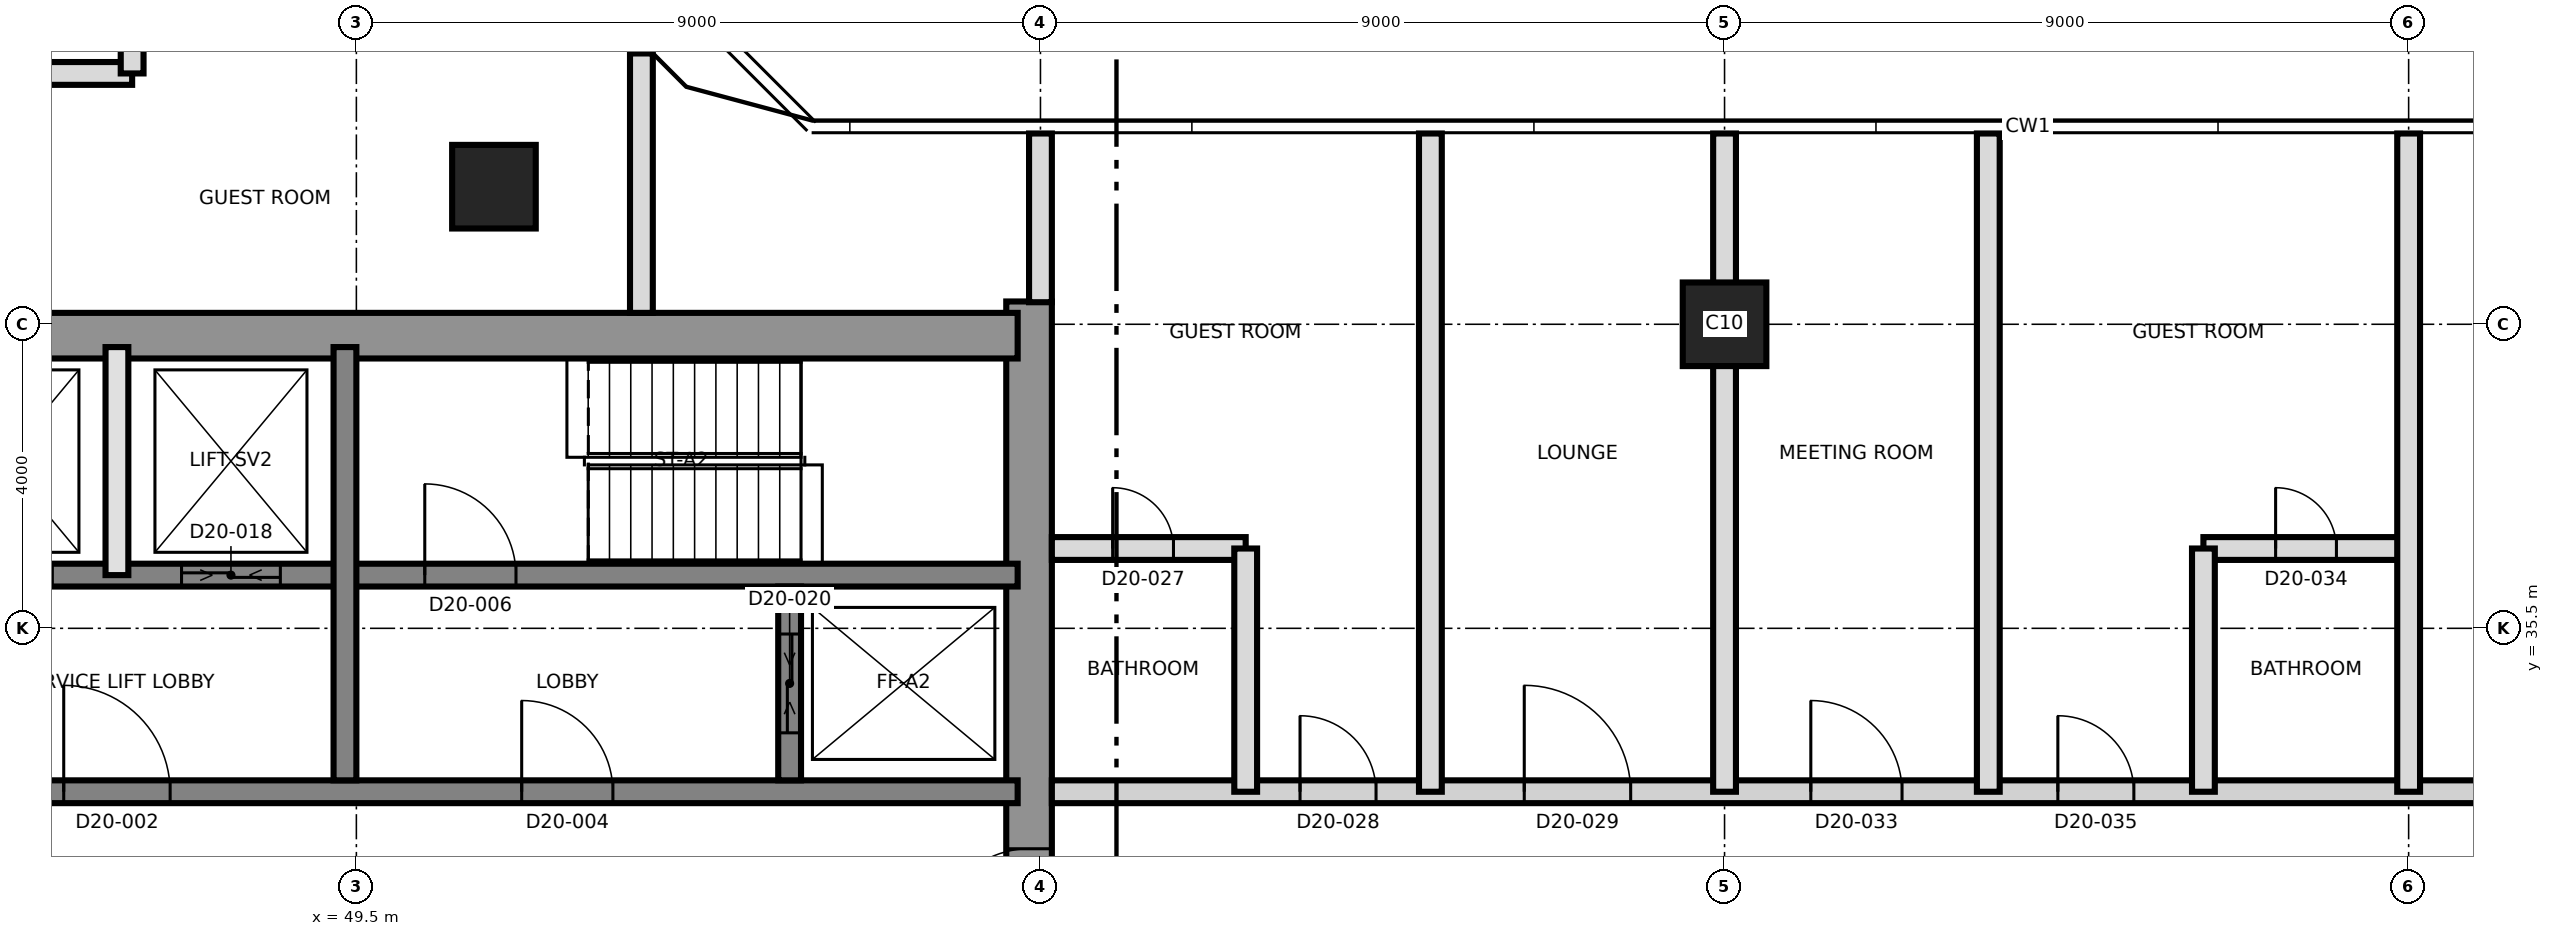
"""IFC4 building model, lengths in metres.
Left out: names, types, materials, properties, quantities, classifications, styles, units other than length and angle.
Written with IfcOpenShell. Run it as: python <this file> out.ifc"""

import sys

from ifc_helpers import new_model, si_unit, direction, frame, frame_2d, origin, origin_2d, place, context, subcontext, project, spatial, rectangle, extrude, element, fill, save


model = new_model("IFC4")
c1 = context("Model", 3, precision=1e-05, world=origin(), true_north=direction((0.0, 1.0)))
c2 = subcontext(c1, "Body", "Model", "MODEL_VIEW")
j1 = project(units=[si_unit("LENGTHUNIT", "METRE"), si_unit("PLANEANGLEUNIT", "RADIAN")], contexts=[c1])
p1 = place(None, origin())
s1 = spatial("IfcSite", under=j1, at=p1, CompositionType="ELEMENT")
p2 = place(p1, origin())
s2 = spatial("IfcBuilding", under=s1, at=p2, CompositionType="ELEMENT")
p3 = place(p2, frame((0.0, 0.0, 186.6)))
s3 = spatial("IfcBuildingStorey", under=s2, at=p3, CompositionType="ELEMENT", Elevation=186.6)
p4 = place(p3, frame((58.35, 21.2, 0.0), z_axis=(0.0, 0.0, 1.0), x_axis=(0.0, 1.0, 0.0)))
e1 = element("IfcWall", 1, at=p4, inside=s3, PredefinedType="SHEAR", context=c2, shape_type="SweptSolid", body=[
    extrude(rectangle(XDim=18.6, YDim=0.6, at=frame_2d((9.3, 0.0))), origin(), (0.0, 0.0, 1.0), 3.7),
])
p5 = place(p4, frame((10.2, 0.0, 0.0)))
e2 = element("IfcOpeningElement", 2, at=p5, cuts=e1, PredefinedType="OPENING", context=c2, shape_type="SweptSolid", body=[
    extrude(rectangle(XDim=1.2, YDim=2.1, at=frame_2d((0.6, 1.05))), frame((0.0, 0.31, 0.0), z_axis=(0.0, -1.0, 0.0), x_axis=(1.0, 0.0, 0.0)), (0.0, 0.0, 1.0), 0.62),
])
p6 = place(p3, frame((31.2, 39.35, 0.0), z_axis=(0.0, 0.0, 1.0), x_axis=(1.0, 0.0, 0.0)))
e3 = element("IfcWall", 3, at=p6, inside=s3, PredefinedType="SHEAR", context=c2, shape_type="SweptSolid", body=[
    extrude(rectangle(XDim=27.0, YDim=0.6, at=frame_2d((13.5, 0.0))), origin(), (0.0, 0.0, 1.0), 3.7),
])
p7 = place(p6, frame((10.5, 0.0, 0.0)))
e4 = element("IfcOpeningElement", 4, at=p7, cuts=e3, PredefinedType="OPENING", context=c2, shape_type="SweptSolid", body=[
    extrude(rectangle(XDim=1.2, YDim=2.1, at=frame_2d((0.6, 1.05))), frame((0.0, 0.31, 0.0), z_axis=(0.0, -1.0, 0.0), x_axis=(1.0, 0.0, 0.0)), (0.0, 0.0, 1.0), 0.62),
])
p8 = place(p3, frame((31.8, 33.35, 0.0), z_axis=(0.0, 0.0, 1.0), x_axis=(1.0, 0.0, 0.0)))
e5 = element("IfcWall", 5, at=p8, inside=s3, PredefinedType="SHEAR", context=c2, shape_type="SweptSolid", body=[
    extrude(rectangle(XDim=26.4, YDim=0.3, at=frame_2d((13.2, 0.0))), origin(), (0.0, 0.0, 1.0), 3.7),
])
p9 = place(p8, frame((13.85, 0.0, 0.0)))
e6 = element("IfcOpeningElement", 6, at=p9, cuts=e5, PredefinedType="OPENING", context=c2, shape_type="SweptSolid", body=[
    extrude(rectangle(XDim=1.4, YDim=2.1, at=frame_2d((0.7, 1.05))), frame((0.0, 0.16, 0.0), z_axis=(0.0, -1.0, 0.0), x_axis=(1.0, 0.0, 0.0)), (0.0, 0.0, 1.0), 0.32),
])
p10 = place(p8, frame((5.325, 0.0, 0.0)))
e7 = element("IfcOpeningElement", 7, at=p10, cuts=e5, PredefinedType="OPENING", context=c2, shape_type="SweptSolid", body=[
    extrude(rectangle(XDim=1.2, YDim=2.1, at=frame_2d((0.6, 1.05))), frame((0.0, 0.16, 0.0), z_axis=(0.0, -1.0, 0.0), x_axis=(1.0, 0.0, 0.0)), (0.0, 0.0, 1.0), 0.32),
])
p11 = place(p8, frame((19.875, 0.0, 0.0)))
e8 = element("IfcOpeningElement", 8, at=p11, cuts=e5, PredefinedType="OPENING", context=c2, shape_type="SweptSolid", body=[
    extrude(rectangle(XDim=1.2, YDim=2.1, at=frame_2d((0.6, 1.05))), frame((0.0, 0.16, 0.0), z_axis=(0.0, -1.0, 0.0), x_axis=(1.0, 0.0, 0.0)), (0.0, 0.0, 1.0), 0.32),
])
p12 = place(p3, frame((43.5, 36.2, 0.0), z_axis=(0.0, 0.0, 1.0), x_axis=(1.0, 0.0, 0.0)))
e9 = element("IfcWall", 9, at=p12, inside=s3, PredefinedType="SHEAR", context=c2, shape_type="SweptSolid", body=[
    extrude(rectangle(XDim=14.7, YDim=0.3, at=frame_2d((7.35, 0.0))), origin(), (0.0, 0.0, 1.0), 3.7),
])
p13 = place(p12, frame((6.9, 0.0, 0.0)))
e10 = element("IfcOpeningElement", 10, at=p13, cuts=e9, PredefinedType="OPENING", context=c2, shape_type="SweptSolid", body=[
    extrude(rectangle(XDim=1.2, YDim=2.1, at=frame_2d((0.6, 1.05))), frame((0.0, 0.16, 0.0), z_axis=(0.0, -1.0, 0.0), x_axis=(1.0, 0.0, 0.0)), (0.0, 0.0, 1.0), 0.32),
])
p14 = place(p12, frame((0.7, 0.0, 0.0)))
e11 = element("IfcOpeningElement", 11, at=p14, cuts=e9, PredefinedType="OPENING", context=c2, shape_type="SweptSolid", body=[
    extrude(rectangle(XDim=1.3, YDim=2.4, at=frame_2d((0.65, 1.2))), frame((0.0, 0.16, 0.0), z_axis=(0.0, -1.0, 0.0), x_axis=(1.0, 0.0, 0.0)), (0.0, 0.0, 1.0), 0.32),
])
p15 = place(p12, frame((3.7, 0.0, 0.0)))
e12 = element("IfcOpeningElement", 12, at=p15, cuts=e9, PredefinedType="OPENING", context=c2, shape_type="SweptSolid", body=[
    extrude(rectangle(XDim=1.3, YDim=2.4, at=frame_2d((0.65, 1.2))), frame((0.0, 0.16, 0.0), z_axis=(0.0, -1.0, 0.0), x_axis=(1.0, 0.0, 0.0)), (0.0, 0.0, 1.0), 0.32),
])
p16 = place(p3, frame((49.35, 33.5, 0.0), z_axis=(0.0, 0.0, 1.0), x_axis=(0.0, 1.0, 0.0)))
e13 = element("IfcWall", 13, at=p16, inside=s3, PredefinedType="SHEAR", context=c2, shape_type="SweptSolid", body=[
    extrude(rectangle(XDim=5.7, YDim=0.3, at=frame_2d((2.85, 0.0))), origin(), (0.0, 0.0, 1.0), 3.7),
])
p17 = place(p3, frame((55.2, 33.5, 0.0), z_axis=(0.0, 0.0, 1.0), x_axis=(0.0, 1.0, 0.0)))
e14 = element("IfcWall", 14, at=p17, inside=s3, PredefinedType="SHEAR", context=c2, shape_type="SweptSolid", body=[
    extrude(rectangle(XDim=2.55, YDim=0.3, at=frame_2d((1.275, 0.0))), origin(), (0.0, 0.0, 1.0), 3.7),
])
p18 = place(p17, frame((0.625, 0.0, 0.0)))
e15 = element("IfcOpeningElement", 15, at=p18, cuts=e14, PredefinedType="OPENING", context=c2, shape_type="SweptSolid", body=[
    extrude(rectangle(XDim=1.3, YDim=2.4, at=frame_2d((0.65, 1.2))), frame((0.0, 0.16, 0.0), z_axis=(0.0, -1.0, 0.0), x_axis=(1.0, 0.0, 0.0)), (0.0, 0.0, 1.0), 0.32),
])
for number, where, z_axis, x_axis in (
    (16, (67.5, 39.5, 0.0), (0.0, 0.0, 1.0), (1.0, 0.0, 0.0)),
    (17, (51.31, 41.31, 0.0), (0.0, 0.0, 1.0), (1.0, 0.0, 0.0)),
):
    element("IfcColumn", number, at=place(p3, frame(where, z_axis=z_axis, x_axis=x_axis)), inside=s3, PredefinedType="COLUMN", context=c2, shape_type="SweptSolid", body=[
        extrude(rectangle(XDim=1.1, YDim=1.1, at=origin_2d()), origin(), (0.0, 0.0, 1.0), 3.7),
    ])
p19 = place(p3, frame((46.35, 36.2, 0.0), z_axis=(0.0, 0.0, 1.0), x_axis=(0.0, 1.0, 0.0)))
e18 = element("IfcWall", 18, at=p19, inside=s3, PredefinedType="SOLIDWALL", context=c2, shape_type="SweptSolid", body=[
    extrude(rectangle(XDim=3.0, YDim=0.3, at=frame_2d((1.5, 0.0))), origin(), (0.0, 0.0, 1.0), 3.4),
])
p20 = place(p3, frame((58.65, 33.35, 0.0), z_axis=(0.0, 0.0, 1.0), x_axis=(1.0, 0.0, 0.0)))
e19 = element("IfcWall", 19, at=p20, inside=s3, PredefinedType="PARTITIONING", context=c2, shape_type="SweptSolid", body=[
    extrude(rectangle(XDim=26.68, YDim=0.3, at=frame_2d((13.34, 0.0))), origin(), (0.0, 0.0, 1.0), 3.4),
])
p21 = place(p20, frame((3.265, 0.0, 0.0)))
e20 = element("IfcOpeningElement", 20, at=p21, cuts=e19, PredefinedType="OPENING", context=c2, shape_type="SweptSolid", body=[
    extrude(rectangle(XDim=1.0, YDim=2.1, at=frame_2d((0.5, 1.05))), frame((0.0, 0.16, 0.0), z_axis=(0.0, -1.0, 0.0), x_axis=(1.0, 0.0, 0.0)), (0.0, 0.0, 1.0), 0.32),
])
p22 = place(p20, frame((6.215, 0.0, 0.0)))
e21 = element("IfcOpeningElement", 21, at=p22, cuts=e19, PredefinedType="OPENING", context=c2, shape_type="SweptSolid", body=[
    extrude(rectangle(XDim=1.4, YDim=2.1, at=frame_2d((0.7, 1.05))), frame((0.0, 0.16, 0.0), z_axis=(0.0, -1.0, 0.0), x_axis=(1.0, 0.0, 0.0)), (0.0, 0.0, 1.0), 0.32),
])
p23 = place(p20, frame((9.985, 0.0, 0.0)))
e22 = element("IfcOpeningElement", 22, at=p23, cuts=e19, PredefinedType="OPENING", context=c2, shape_type="SweptSolid", body=[
    extrude(rectangle(XDim=1.2, YDim=2.1, at=frame_2d((0.6, 1.05))), frame((0.0, 0.16, 0.0), z_axis=(0.0, -1.0, 0.0), x_axis=(1.0, 0.0, 0.0)), (0.0, 0.0, 1.0), 0.32),
])
p24 = place(p20, frame((13.235, 0.0, 0.0)))
e23 = element("IfcOpeningElement", 23, at=p24, cuts=e19, PredefinedType="OPENING", context=c2, shape_type="SweptSolid", body=[
    extrude(rectangle(XDim=1.0, YDim=2.1, at=frame_2d((0.5, 1.05))), frame((0.0, 0.16, 0.0), z_axis=(0.0, -1.0, 0.0), x_axis=(1.0, 0.0, 0.0)), (0.0, 0.0, 1.0), 0.32),
])
p25 = place(p20, frame((20.2, 0.0, 0.0)))
e24 = element("IfcOpeningElement", 24, at=p25, cuts=e19, PredefinedType="OPENING", context=c2, shape_type="SweptSolid", body=[
    extrude(rectangle(XDim=1.0, YDim=2.1, at=frame_2d((0.5, 1.05))), frame((0.0, 0.16, 0.0), z_axis=(0.0, -1.0, 0.0), x_axis=(1.0, 0.0, 0.0)), (0.0, 0.0, 1.0), 0.32),
])
p26 = place(p3, frame((58.65, 36.55, 0.0), z_axis=(0.0, 0.0, 1.0), x_axis=(1.0, 0.0, 0.0)))
e25 = element("IfcWall", 25, at=p26, inside=s3, PredefinedType="PARTITIONING", context=c2, shape_type="SweptSolid", body=[
    extrude(rectangle(XDim=2.55, YDim=0.3, at=frame_2d((1.275, 0.0))), origin(), (0.0, 0.0, 1.0), 3.4),
])
p27 = place(p26, frame((0.8, 0.0, 0.0)))
e26 = element("IfcOpeningElement", 26, at=p27, cuts=e25, PredefinedType="OPENING", context=c2, shape_type="SweptSolid", body=[
    extrude(rectangle(XDim=0.8, YDim=2.1, at=frame_2d((0.4, 1.05))), frame((0.0, 0.16, 0.0), z_axis=(0.0, -1.0, 0.0), x_axis=(1.0, 0.0, 0.0)), (0.0, 0.0, 1.0), 0.32),
])
p28 = place(p3, frame((73.8, 36.55, 0.0), z_axis=(0.0, 0.0, 1.0), x_axis=(1.0, 0.0, 0.0)))
e27 = element("IfcWall", 27, at=p28, inside=s3, PredefinedType="PARTITIONING", context=c2, shape_type="SweptSolid", body=[
    extrude(rectangle(XDim=2.7, YDim=0.3, at=frame_2d((1.35, 0.0))), origin(), (0.0, 0.0, 1.0), 3.4),
])
p29 = place(p28, frame((0.95, 0.0, 0.0)))
e28 = element("IfcOpeningElement", 28, at=p29, cuts=e27, PredefinedType="OPENING", context=c2, shape_type="SweptSolid", body=[
    extrude(rectangle(XDim=0.8, YDim=2.1, at=frame_2d((0.4, 1.05))), frame((0.0, 0.16, 0.0), z_axis=(0.0, -1.0, 0.0), x_axis=(1.0, 0.0, 0.0)), (0.0, 0.0, 1.0), 0.32),
])
p30 = place(p3, frame((43.35, 42.8, 0.0), z_axis=(0.0, 0.0, 1.0), x_axis=(1.0, 0.0, 0.0)))
e29 = element("IfcWall", 29, at=p30, inside=s3, PredefinedType="PARTITIONING", context=c2, shape_type="SweptSolid", body=[
    extrude(rectangle(XDim=3.2, YDim=0.3, at=frame_2d((1.6, 0.0))), origin(), (0.0, 0.0, 1.0), 3.4),
])
p31 = place(p3, frame((46.55, 42.8, 0.0), z_axis=(0.0, 0.0, 1.0), x_axis=(0.0, 1.0, 0.0)))
e30 = element("IfcWall", 30, at=p31, inside=s3, PredefinedType="PARTITIONING", context=c2, shape_type="SweptSolid", body=[
    extrude(rectangle(XDim=2.7, YDim=0.3, at=frame_2d((1.35, 0.0))), origin(), (0.0, 0.0, 1.0), 3.4),
])
p32 = place(p31, frame((0.95, 0.0, 0.0)))
e31 = element("IfcOpeningElement", 31, at=p32, cuts=e30, PredefinedType="OPENING", context=c2, shape_type="SweptSolid", body=[
    extrude(rectangle(XDim=0.8, YDim=2.1, at=frame_2d((0.4, 1.05))), frame((0.0, 0.16, 0.0), z_axis=(0.0, -1.0, 0.0), x_axis=(1.0, 0.0, 0.0)), (0.0, 0.0, 1.0), 0.32),
])
p33 = place(p3, frame((53.25, 39.65, 0.0), z_axis=(0.0, 0.0, 1.0), x_axis=(0.0, 1.0, 0.0)))
e32 = element("IfcWall", 32, at=p33, inside=s3, PredefinedType="PARTITIONING", context=c2, shape_type="SweptSolid", body=[
    extrude(rectangle(XDim=3.413, YDim=0.3, at=frame_2d((1.707, 0.0))), origin(), (0.0, 0.0, 1.0), 3.35),
])
p34 = place(p3, frame((58.5, 39.79, 0.0), z_axis=(0.0, 0.0, 1.0), x_axis=(0.0, 1.0, 0.0)))
e33 = element("IfcWall", 33, at=p34, inside=s3, PredefinedType="PARTITIONING", context=c2, shape_type="SweptSolid", body=[
    extrude(rectangle(XDim=2.22, YDim=0.3, at=frame_2d((1.11, 0.0))), origin(), (0.0, 0.0, 1.0), 3.35),
])
p35 = place(p3, frame((61.2, 33.35, 0.0), z_axis=(0.0, 0.0, 1.0), x_axis=(0.0, 1.0, 0.0)))
e34 = element("IfcWall", 34, at=p35, inside=s3, PredefinedType="PARTITIONING", context=c2, shape_type="SweptSolid", body=[
    extrude(rectangle(XDim=3.2, YDim=0.3, at=frame_2d((1.6, 0.0))), origin(), (0.0, 0.0, 1.0), 3.4),
])
for number, where, z_axis, x_axis in (
    (35, (63.63, 33.35, 0.0), (0.0, 0.0, 1.0), (0.0, 1.0, 0.0)),
    (36, (67.5, 33.35, 0.0), (0.0, 0.0, 1.0), (0.0, 1.0, 0.0)),
    (37, (70.97, 33.35, 0.0), (0.0, 0.0, 1.0), (0.0, 1.0, 0.0)),
):
    element("IfcWall", number, at=place(p3, frame(where, z_axis=z_axis, x_axis=x_axis)), inside=s3, PredefinedType="PARTITIONING", context=c2, shape_type="SweptSolid", body=[
        extrude(rectangle(XDim=8.66, YDim=0.3, at=frame_2d((4.33, 0.0))), origin(), (0.0, 0.0, 1.0), 3.35),
    ])
p36 = place(p3, frame((73.8, 33.35, 0.0), z_axis=(0.0, 0.0, 1.0), x_axis=(0.0, 1.0, 0.0)))
e38 = element("IfcWall", 38, at=p36, inside=s3, PredefinedType="PARTITIONING", context=c2, shape_type="SweptSolid", body=[
    extrude(rectangle(XDim=3.2, YDim=0.3, at=frame_2d((1.6, 0.0))), origin(), (0.0, 0.0, 1.0), 3.4),
])
p37 = place(p3, frame((76.5, 33.35, 0.0), z_axis=(0.0, 0.0, 1.0), x_axis=(0.0, 1.0, 0.0)))
e39 = element("IfcWall", 39, at=p37, inside=s3, PredefinedType="PARTITIONING", context=c2, shape_type="SweptSolid", body=[
    extrude(rectangle(XDim=8.66, YDim=0.3, at=frame_2d((4.33, 0.0))), origin(), (0.0, 0.0, 1.0), 3.35),
])
p38 = place(p9, origin())
e40 = element("IfcDoor", 40, at=p38, inside=s3, OperationType="SINGLE_SWING_RIGHT", PredefinedType="DOOR", context=c2, shape_type="SweptSolid", body=[
    extrude(rectangle(XDim=1.4, YDim=2.1, at=frame_2d((0.7, 1.05))), frame((0.0, 0.025, 0.0), z_axis=(0.0, -1.0, 0.0), x_axis=(1.0, 0.0, 0.0)), (0.0, 0.0, 1.0), 0.05),
])
fill(e6, e40)
p39 = place(p11, origin())
e41 = element("IfcDoor", 41, at=p39, inside=s3, OperationType="SINGLE_SWING_RIGHT", PredefinedType="DOOR", context=c2, shape_type="SweptSolid", body=[
    extrude(rectangle(XDim=1.2, YDim=2.1, at=frame_2d((0.6, 1.05))), frame((0.0, 0.025, 0.0), z_axis=(0.0, -1.0, 0.0), x_axis=(1.0, 0.0, 0.0)), (0.0, 0.0, 1.0), 0.05),
])
fill(e8, e41)
p40 = place(p13, origin())
e42 = element("IfcDoor", 42, at=p40, inside=s3, OperationType="SINGLE_SWING_LEFT", PredefinedType="DOOR", context=c2, shape_type="SweptSolid", body=[
    extrude(rectangle(XDim=1.2, YDim=2.1, at=frame_2d((0.6, 1.05))), frame((0.0, 0.025, 0.0), z_axis=(0.0, -1.0, 0.0), x_axis=(1.0, 0.0, 0.0)), (0.0, 0.0, 1.0), 0.05),
])
fill(e10, e42)
p41 = place(p5, origin())
e43 = element("IfcDoor", 43, at=p41, inside=s3, OperationType="SINGLE_SWING_LEFT", PredefinedType="DOOR", context=c2, shape_type="SweptSolid", body=[
    extrude(rectangle(XDim=1.2, YDim=2.1, at=frame_2d((0.6, 1.05))), frame((0.0, 0.025, 0.0), z_axis=(0.0, -1.0, 0.0), x_axis=(1.0, 0.0, 0.0)), (0.0, 0.0, 1.0), 0.05),
])
fill(e2, e43)
p42 = place(p15, origin())
e44 = element("IfcDoor", 44, at=p42, inside=s3, OperationType="SLIDING_TO_LEFT", PredefinedType="DOOR", context=c2, shape_type="SweptSolid", body=[
    extrude(rectangle(XDim=1.3, YDim=2.4, at=frame_2d((0.65, 1.2))), frame((0.0, 0.025, 0.0), z_axis=(0.0, -1.0, 0.0), x_axis=(1.0, 0.0, 0.0)), (0.0, 0.0, 1.0), 0.05),
])
fill(e12, e44)
p43 = place(p18, origin())
e45 = element("IfcDoor", 45, at=p43, inside=s3, OperationType="SLIDING_TO_LEFT", PredefinedType="DOOR", context=c2, shape_type="SweptSolid", body=[
    extrude(rectangle(XDim=1.3, YDim=2.4, at=frame_2d((0.65, 1.2))), frame((0.0, 0.025, 0.0), z_axis=(0.0, -1.0, 0.0), x_axis=(1.0, 0.0, 0.0)), (0.0, 0.0, 1.0), 0.05),
])
fill(e15, e45)
p44 = place(p27, origin())
e46 = element("IfcDoor", 46, at=p44, inside=s3, OperationType="SINGLE_SWING_LEFT", PredefinedType="DOOR", context=c2, shape_type="SweptSolid", body=[
    extrude(rectangle(XDim=0.8, YDim=2.1, at=frame_2d((0.4, 1.05))), frame((0.0, 0.025, 0.0), z_axis=(0.0, -1.0, 0.0), x_axis=(1.0, 0.0, 0.0)), (0.0, 0.0, 1.0), 0.05),
])
fill(e26, e46)
p45 = place(p21, origin())
e47 = element("IfcDoor", 47, at=p45, inside=s3, OperationType="SINGLE_SWING_LEFT", PredefinedType="DOOR", context=c2, shape_type="SweptSolid", body=[
    extrude(rectangle(XDim=1.0, YDim=2.1, at=frame_2d((0.5, 1.05))), frame((0.0, 0.025, 0.0), z_axis=(0.0, -1.0, 0.0), x_axis=(1.0, 0.0, 0.0)), (0.0, 0.0, 1.0), 0.05),
])
fill(e20, e47)
p46 = place(p22, origin())
e48 = element("IfcDoor", 48, at=p46, inside=s3, OperationType="SINGLE_SWING_RIGHT", PredefinedType="DOOR", context=c2, shape_type="SweptSolid", body=[
    extrude(rectangle(XDim=1.4, YDim=2.1, at=frame_2d((0.7, 1.05))), frame((0.0, 0.025, 0.0), z_axis=(0.0, -1.0, 0.0), x_axis=(1.0, 0.0, 0.0)), (0.0, 0.0, 1.0), 0.05),
])
fill(e21, e48)
p47 = place(p23, origin())
e49 = element("IfcDoor", 49, at=p47, inside=s3, OperationType="SINGLE_SWING_LEFT", PredefinedType="DOOR", context=c2, shape_type="SweptSolid", body=[
    extrude(rectangle(XDim=1.2, YDim=2.1, at=frame_2d((0.6, 1.05))), frame((0.0, 0.025, 0.0), z_axis=(0.0, -1.0, 0.0), x_axis=(1.0, 0.0, 0.0)), (0.0, 0.0, 1.0), 0.05),
])
fill(e22, e49)
p48 = place(p29, origin())
e50 = element("IfcDoor", 50, at=p48, inside=s3, OperationType="SINGLE_SWING_RIGHT", PredefinedType="DOOR", context=c2, shape_type="SweptSolid", body=[
    extrude(rectangle(XDim=0.8, YDim=2.1, at=frame_2d((0.4, 1.05))), frame((0.0, 0.025, 0.0), z_axis=(0.0, -1.0, 0.0), x_axis=(1.0, 0.0, 0.0)), (0.0, 0.0, 1.0), 0.05),
])
fill(e28, e50)
p49 = place(p24, origin())
e51 = element("IfcDoor", 51, at=p49, inside=s3, OperationType="SINGLE_SWING_LEFT", PredefinedType="DOOR", context=c2, shape_type="SweptSolid", body=[
    extrude(rectangle(XDim=1.0, YDim=2.1, at=frame_2d((0.5, 1.05))), frame((0.0, 0.025, 0.0), z_axis=(0.0, -1.0, 0.0), x_axis=(1.0, 0.0, 0.0)), (0.0, 0.0, 1.0), 0.05),
])
fill(e23, e51)
save(model, sys.argv[1])
